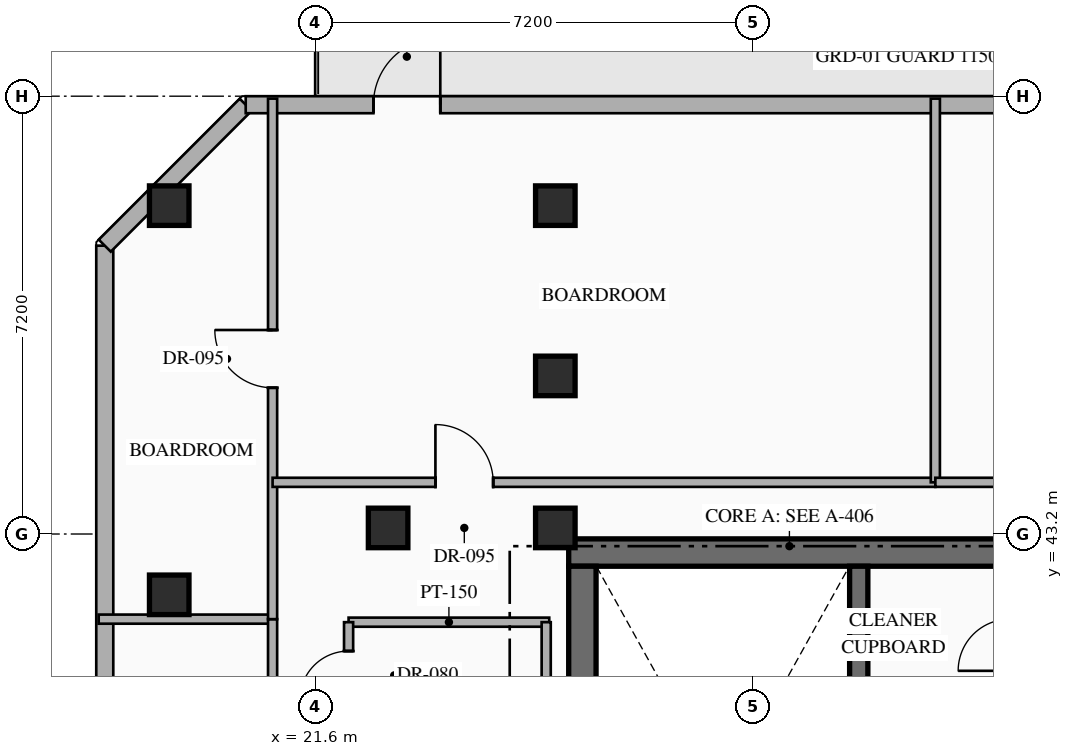
"""IFC4 building model, lengths in metres.
Left out: names, types, materials, properties, quantities, classifications, styles, units other than length and angle.
Written with IfcOpenShell. Run it as: python <this file> out.ifc"""

import sys

from ifc_helpers import new_model, si_unit, direction, frame, frame_2d, origin, origin_2d, place, context, subcontext, project, spatial, rectangle, hollow_rectangle, extrude, element, fill, save


model = new_model("IFC4")
c1 = context("Model", 3, precision=1e-05, world=origin(), true_north=direction((0.0, 1.0)))
c2 = subcontext(c1, "Body", "Model", "MODEL_VIEW")
j1 = project(units=[si_unit("LENGTHUNIT", "METRE"), si_unit("PLANEANGLEUNIT", "RADIAN")], contexts=[c1])
p1 = place(None, origin())
s1 = spatial("IfcSite", under=j1, at=p1, CompositionType="ELEMENT")
p2 = place(p1, origin())
s2 = spatial("IfcBuilding", under=s1, at=p2, CompositionType="ELEMENT")
p3 = place(p2, frame((0.0, 0.0, 253.95)))
s3 = spatial("IfcBuildingStorey", under=s2, at=p3, CompositionType="ELEMENT", Elevation=253.95)
p4 = place(p3, frame((25.77, 42.895, 0.0), z_axis=(0.0, 0.0, 1.0), x_axis=(1.0, 0.0, 0.0)))
e1 = element("IfcWall", 1, at=p4, inside=s3, PredefinedType="SHEAR", context=c2, shape_type="SweptSolid", body=[
    extrude(rectangle(XDim=7.48, YDim=0.45, at=frame_2d((3.74, 0.0))), origin(), (0.0, 0.0, 1.0), 3.6),
])
p5 = place(p3, frame((25.995, 33.19, 0.0), z_axis=(0.0, 0.0, 1.0), x_axis=(0.0, 1.0, 0.0)))
e2 = element("IfcWall", 2, at=p5, inside=s3, PredefinedType="SHEAR", context=c2, shape_type="SweptSolid", body=[
    extrude(rectangle(XDim=9.48, YDim=0.45, at=frame_2d((4.74, 0.0))), origin(), (0.0, 0.0, 1.0), 3.6),
])
p6 = place(p3, frame((30.54, 33.19, 0.0), z_axis=(0.0, 0.0, 1.0), x_axis=(0.0, 1.0, 0.0)))
e3 = element("IfcWall", 3, at=p6, inside=s3, PredefinedType="SHEAR", context=c2, shape_type="SweptSolid", body=[
    extrude(rectangle(XDim=9.48, YDim=0.3, at=frame_2d((4.74, 0.0))), origin(), (0.0, 0.0, 1.0), 3.6),
])
for number, where, z_axis, x_axis in (
    (4, (25.55, 43.3, 0.0), (0.0, 0.0, 1.0), (1.0, 0.0, 0.0)),
    (5, (25.55, 45.8, 0.0), (0.0, 0.0, 1.0), (1.0, 0.0, 0.0)),
    (6, (19.2, 48.6, 0.0), (0.0, 0.0, 1.0), (1.0, 0.0, 0.0)),
    (7, (25.55, 48.6, 0.0), (0.0, 0.0, 1.0), (1.0, 0.0, 0.0)),
    (8, (19.2, 42.2, 0.0), (0.0, 0.0, 1.0), (1.0, 0.0, 0.0)),
    (9, (22.8, 43.3, 0.0), (0.0, 0.0, 1.0), (1.0, 0.0, 0.0)),
):
    element("IfcColumn", number, at=place(p3, frame(where, z_axis=z_axis, x_axis=x_axis)), inside=s3, PredefinedType="COLUMN", context=c2, shape_type="SweptSolid", body=[
        extrude(hollow_rectangle(XDim=0.65, YDim=0.65, WallThickness=0.025, at=origin_2d()), origin(), (0.0, 0.0, 1.0), 3.6),
    ])
p7 = place(p3, frame((18.14, 25.858, 0.0), z_axis=(0.0, 0.0, 1.0), x_axis=(0.0, 1.0, 0.0)))
e10 = element("IfcWall", 10, at=p7, inside=s3, PredefinedType="STANDARD", context=c2, shape_type="SweptSolid", body=[
    extrude(rectangle(XDim=22.084, YDim=0.28, at=frame_2d((11.042, 0.0))), origin(), (0.0, 0.0, 1.0), 3.35),
])
p8 = place(p3, frame((18.14, 47.942, 0.0), z_axis=(0.0, 0.0, 1.0), x_axis=(0.707106781187, 0.707106781187, 0.0)))
e11 = element("IfcWall", 11, at=p8, inside=s3, PredefinedType="STANDARD", context=c2, shape_type="SweptSolid", body=[
    extrude(rectangle(XDim=3.278, YDim=0.28, at=frame_2d((1.639, 0.0))), origin(), (0.0, 0.0, 1.0), 3.35),
])
p9 = place(p3, frame((20.458, 50.26, 0.0), z_axis=(0.0, 0.0, 1.0), x_axis=(1.0, 0.0, 0.0)))
e12 = element("IfcWall", 12, at=p9, inside=s3, PredefinedType="STANDARD", context=c2, shape_type="SweptSolid", body=[
    extrude(rectangle(XDim=22.084, YDim=0.28, at=frame_2d((11.042, 0.0))), origin(), (0.0, 0.0, 1.0), 3.35),
])
p10 = place(p9, frame((2.1, 0.0, 0.0)))
e13 = element("IfcOpeningElement", 13, at=p10, cuts=e12, PredefinedType="OPENING", context=c2, shape_type="SweptSolid", body=[
    extrude(rectangle(XDim=1.1, YDim=2.2, at=frame_2d((0.55, 1.1))), frame((0.0, 0.15, 0.0), z_axis=(0.0, -1.0, 0.0), x_axis=(1.0, 0.0, 0.0)), (0.0, 0.0, 1.0), 0.3),
])
p11 = place(p9, frame((15.663, 0.0, 0.85)))
e14 = element("IfcOpeningElement", 14, at=p11, cuts=e12, PredefinedType="OPENING", context=c2, shape_type="SweptSolid", body=[
    extrude(rectangle(XDim=1.8, YDim=2.1, at=frame_2d((0.9, 1.05))), frame((0.0, 0.15, 0.0), z_axis=(0.0, -1.0, 0.0), x_axis=(1.0, 0.0, 0.0)), (0.0, 0.0, 1.0), 0.3),
])
p12 = place(p3, frame((22.15, 41.75, 0.0), z_axis=(0.0, 0.0, 1.0), x_axis=(1.0, 0.0, 0.0)))
e15 = element("IfcWall", 15, at=p12, inside=s3, PredefinedType="PARTITIONING", context=c2, shape_type="SweptSolid", body=[
    extrude(rectangle(XDim=3.3, YDim=0.15, at=frame_2d((1.65, 0.0))), origin(), (0.0, 0.0, 1.0), 3.35),
])
p13 = place(p3, frame((25.4, 36.5, 0.0), z_axis=(0.0, 0.0, 1.0), x_axis=(0.0, 1.0, 0.0)))
e16 = element("IfcWall", 16, at=p13, inside=s3, PredefinedType="PARTITIONING", context=c2, shape_type="SweptSolid", body=[
    extrude(rectangle(XDim=5.25, YDim=0.15, at=frame_2d((2.625, 0.0))), origin(), (0.0, 0.0, 1.0), 3.35),
])
p14 = place(p3, frame((22.15, 40.0, 0.0), z_axis=(0.0, 0.0, 1.0), x_axis=(0.0, 1.0, 0.0)))
e17 = element("IfcWall", 17, at=p14, inside=s3, PredefinedType="PARTITIONING", context=c2, shape_type="SweptSolid", body=[
    extrude(rectangle(XDim=1.75, YDim=0.15, at=frame_2d((0.875, 0.0))), origin(), (0.0, 0.0, 1.0), 3.35),
])
p15 = place(p14, frame((0.475, 0.0, 0.0)))
e18 = element("IfcOpeningElement", 18, at=p15, cuts=e17, PredefinedType="OPENING", context=c2, shape_type="SweptSolid", body=[
    extrude(rectangle(XDim=0.8, YDim=2.06, at=frame_2d((0.4, 1.03))), frame((0.0, 0.085, 0.0), z_axis=(0.0, -1.0, 0.0), x_axis=(1.0, 0.0, 0.0)), (0.0, 0.0, 1.0), 0.17),
])
p16 = place(p3, frame((18.04, 41.8, 0.0), z_axis=(0.0, 0.0, 1.0), x_axis=(1.0, 0.0, 0.0)))
e19 = element("IfcWall", 19, at=p16, inside=s3, PredefinedType="PARTITIONING", context=c2, shape_type="SweptSolid", body=[
    extrude(rectangle(XDim=2.86, YDim=0.15, at=frame_2d((1.43, 0.0))), origin(), (0.0, 0.0, 1.0), 3.35),
])
p17 = place(p3, frame((20.9, 31.6, 0.0), z_axis=(0.0, 0.0, 1.0), x_axis=(0.0, 1.0, 0.0)))
e20 = element("IfcWall", 20, at=p17, inside=s3, PredefinedType="PARTITIONING", context=c2, shape_type="SweptSolid", body=[
    extrude(rectangle(XDim=10.2, YDim=0.15, at=frame_2d((5.1, 0.0))), origin(), (0.0, 0.0, 1.0), 3.35),
])
p18 = place(p17, frame((2.927, 0.0, 0.0)))
e21 = element("IfcOpeningElement", 21, at=p18, cuts=e20, PredefinedType="OPENING", context=c2, shape_type="SweptSolid", body=[
    extrude(rectangle(XDim=0.95, YDim=2.15, at=frame_2d((0.475, 1.075))), frame((0.0, 0.085, 0.0), z_axis=(0.0, -1.0, 0.0), x_axis=(1.0, 0.0, 0.0)), (0.0, 0.0, 1.0), 0.17),
])
p19 = place(p3, frame((20.9, 41.8, 0.0), z_axis=(0.0, 0.0, 1.0), x_axis=(0.0, 1.0, 0.0)))
e22 = element("IfcWall", 22, at=p19, inside=s3, PredefinedType="PARTITIONING", context=c2, shape_type="SweptSolid", body=[
    extrude(rectangle(XDim=8.56, YDim=0.15, at=frame_2d((4.28, 0.0))), origin(), (0.0, 0.0, 1.0), 3.35),
])
p20 = place(p19, frame((3.805, 0.0, 0.0)))
e23 = element("IfcOpeningElement", 23, at=p20, cuts=e22, PredefinedType="OPENING", context=c2, shape_type="SweptSolid", body=[
    extrude(rectangle(XDim=0.95, YDim=2.15, at=frame_2d((0.475, 1.075))), frame((0.0, 0.085, 0.0), z_axis=(0.0, -1.0, 0.0), x_axis=(1.0, 0.0, 0.0)), (0.0, 0.0, 1.0), 0.17),
])
p21 = place(p3, frame((20.9, 44.05, 0.0), z_axis=(0.0, 0.0, 1.0), x_axis=(1.0, 0.0, 0.0)))
e24 = element("IfcWall", 24, at=p21, inside=s3, PredefinedType="PARTITIONING", context=c2, shape_type="SweptSolid", body=[
    extrude(rectangle(XDim=10.9, YDim=0.15, at=frame_2d((5.45, 0.0))), origin(), (0.0, 0.0, 1.0), 3.35),
])
p22 = place(p21, frame((2.678, 0.0, 0.0)))
e25 = element("IfcOpeningElement", 25, at=p22, cuts=e24, PredefinedType="OPENING", context=c2, shape_type="SweptSolid", body=[
    extrude(rectangle(XDim=0.95, YDim=2.15, at=frame_2d((0.475, 1.075))), frame((0.0, 0.085, 0.0), z_axis=(0.0, -1.0, 0.0), x_axis=(1.0, 0.0, 0.0)), (0.0, 0.0, 1.0), 0.17),
])
p23 = place(p3, frame((31.8, 44.05, 0.0), z_axis=(0.0, 0.0, 1.0), x_axis=(0.0, 1.0, 0.0)))
e26 = element("IfcWall", 26, at=p23, inside=s3, PredefinedType="PARTITIONING", context=c2, shape_type="SweptSolid", body=[
    extrude(rectangle(XDim=6.31, YDim=0.15, at=frame_2d((3.155, 0.0))), origin(), (0.0, 0.0, 1.0), 3.35),
])
p24 = place(p3, frame((31.8, 44.05, 0.0), z_axis=(0.0, 0.0, 1.0), x_axis=(1.0, 0.0, 0.0)))
e27 = element("IfcWall", 27, at=p24, inside=s3, PredefinedType="PARTITIONING", context=c2, shape_type="SweptSolid", body=[
    extrude(rectangle(XDim=13.16, YDim=0.15, at=frame_2d((6.58, 0.0))), origin(), (0.0, 0.0, 1.0), 3.35),
])
p25 = place(p24, frame((6.105, 0.0, 0.0)))
e28 = element("IfcOpeningElement", 28, at=p25, cuts=e27, PredefinedType="OPENING", context=c2, shape_type="SweptSolid", body=[
    extrude(rectangle(XDim=0.95, YDim=2.15, at=frame_2d((0.475, 1.075))), frame((0.0, 0.085, 0.0), z_axis=(0.0, -1.0, 0.0), x_axis=(1.0, 0.0, 0.0)), (0.0, 0.0, 1.0), 0.17),
])
p26 = place(p10, origin())
e29 = element("IfcDoor", 29, at=p26, inside=s3, OperationType="SINGLE_SWING_RIGHT", PredefinedType="DOOR", context=c2, shape_type="SweptSolid", body=[
    extrude(rectangle(XDim=1.1, YDim=2.2, at=frame_2d((0.55, 1.1))), frame((0.0, 0.025, 0.0), z_axis=(0.0, -1.0, 0.0), x_axis=(1.0, 0.0, 0.0)), (0.0, 0.0, 1.0), 0.05),
])
fill(e13, e29)
p27 = place(p15, origin())
e30 = element("IfcDoor", 30, at=p27, inside=s3, OperationType="SINGLE_SWING_LEFT", PredefinedType="DOOR", context=c2, shape_type="SweptSolid", body=[
    extrude(rectangle(XDim=0.8, YDim=2.06, at=frame_2d((0.4, 1.03))), frame((0.0, 0.025, 0.0), z_axis=(0.0, -1.0, 0.0), x_axis=(1.0, 0.0, 0.0)), (0.0, 0.0, 1.0), 0.05),
])
fill(e18, e30)
p28 = place(p20, origin())
e31 = element("IfcDoor", 31, at=p28, inside=s3, OperationType="SINGLE_SWING_RIGHT", PredefinedType="DOOR", context=c2, shape_type="SweptSolid", body=[
    extrude(rectangle(XDim=0.95, YDim=2.15, at=frame_2d((0.475, 1.075))), frame((0.0, 0.025, 0.0), z_axis=(0.0, -1.0, 0.0), x_axis=(1.0, 0.0, 0.0)), (0.0, 0.0, 1.0), 0.05),
])
fill(e23, e31)
p29 = place(p22, origin())
e32 = element("IfcDoor", 32, at=p29, inside=s3, OperationType="SINGLE_SWING_LEFT", PredefinedType="DOOR", context=c2, shape_type="SweptSolid", body=[
    extrude(rectangle(XDim=0.95, YDim=2.15, at=frame_2d((0.475, 1.075))), frame((0.0, 0.025, 0.0), z_axis=(0.0, -1.0, 0.0), x_axis=(1.0, 0.0, 0.0)), (0.0, 0.0, 1.0), 0.05),
])
fill(e25, e32)
save(model, sys.argv[1])
